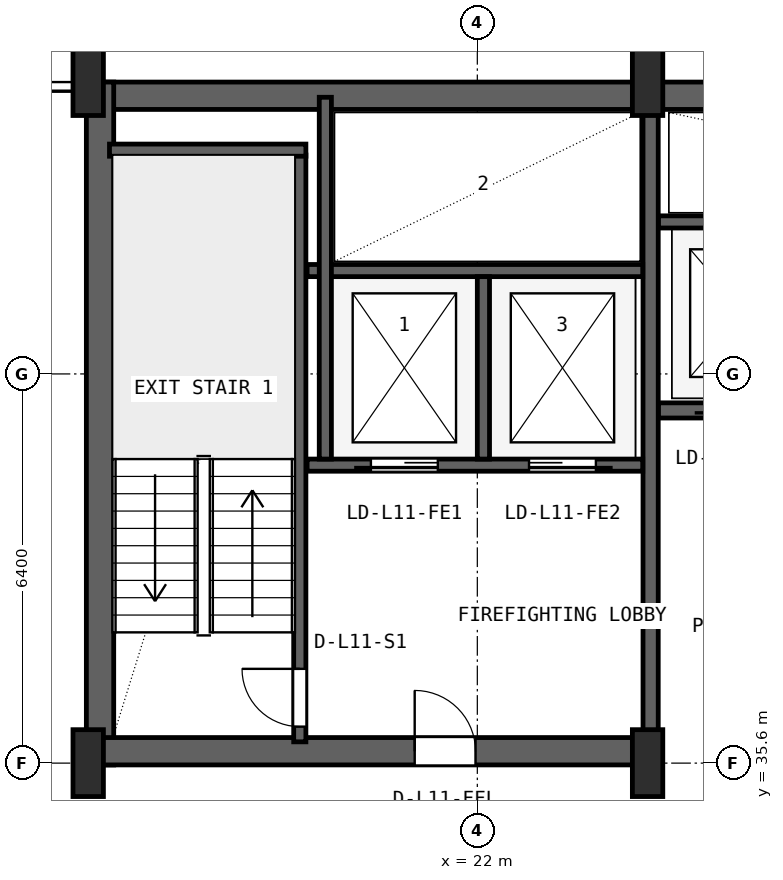
"""IFC4 building model, lengths in metres.
Left out: names, types, materials, properties, quantities, classifications, styles, units other than length and angle.
Written with IfcOpenShell. Run it as: python <this file> out.ifc"""

import sys

from ifc_helpers import new_model, si_unit, direction, frame, frame_2d, origin, origin_2d, place, context, subcontext, project, spatial, rectangle, i_section, extrude, source, transform, mapped, element, fill, save


model = new_model("IFC4")
c1 = context("Model", 3, precision=1e-05, world=origin(), true_north=direction((0.0, 1.0)))
c2 = subcontext(c1, "Body", "Model", "MODEL_VIEW")
j1 = project(units=[si_unit("LENGTHUNIT", "METRE"), si_unit("PLANEANGLEUNIT", "RADIAN")], contexts=[c1])
p1 = place(None, origin())
s1 = spatial("IfcSite", under=j1, at=p1, CompositionType="ELEMENT")
p2 = place(p1, origin())
s2 = spatial("IfcBuilding", under=s1, at=p2, CompositionType="ELEMENT")
p3 = place(p2, frame((0.0, 0.0, 51.0)))
s3 = spatial("IfcBuildingStorey", under=s2, at=p3, CompositionType="ELEMENT", Elevation=51.0)
p4 = place(p3, frame((15.6, 46.575, 0.0), z_axis=(0.0, 0.0, 1.0), x_axis=(1.0, 0.0, 0.0)))
e1 = element("IfcWall", 1, at=p4, inside=s3, PredefinedType="SHEAR", context=c2, shape_type="SweptSolid", body=[
    extrude(rectangle(XDim=36.8, YDim=0.45, at=frame_2d((18.4, 0.0))), origin(), (0.0, 0.0, 1.0), 3.65),
])
p5 = place(p3, frame((15.795, 35.57, 0.0), z_axis=(0.0, 0.0, 1.0), x_axis=(0.0, 1.0, 0.0)))
e2 = element("IfcWall", 2, at=p5, inside=s3, PredefinedType="SHEAR", context=c2, shape_type="SweptSolid", body=[
    extrude(rectangle(XDim=11.23, YDim=0.45, at=frame_2d((5.615, 0.0))), origin(), (0.0, 0.0, 1.0), 3.65),
])
p6 = place(p3, frame((15.57, 35.795, 0.0), z_axis=(0.0, 0.0, 1.0), x_axis=(1.0, 0.0, 0.0)))
e3 = element("IfcWall", 3, at=p6, inside=s3, PredefinedType="SHEAR", context=c2, shape_type="SweptSolid", body=[
    extrude(rectangle(XDim=9.23, YDim=0.45, at=frame_2d((4.615, 0.0))), origin(), (0.0, 0.0, 1.0), 3.65),
])
p7 = place(p6, frame((5.4, 0.0, 0.0)))
e4 = element("IfcOpeningElement", 4, at=p7, cuts=e3, PredefinedType="OPENING", context=c2, shape_type="SweptSolid", body=[
    extrude(rectangle(XDim=1.0, YDim=2.1, at=frame_2d((0.5, 1.05))), frame((0.0, 0.235, 0.0), z_axis=(0.0, -1.0, 0.0), x_axis=(1.0, 0.0, 0.0)), (0.0, 0.0, 1.0), 0.47),
])
m1 = source(origin(), c2, "Body", "SweptSolid", [
    extrude(i_section(OverallWidth=0.5, OverallDepth=1.1, WebThickness=0.018, FlangeThickness=0.032, FilletRadius=0.018, at=origin_2d()), origin(), (0.0, 0.0, 1.0), 3.9),
])
for number, where, z_axis, x_axis in (
    (5, (15.6, 35.6, 0.0), (0.0, 0.0, 1.0), (1.0, 0.0, 0.0)),
    (6, (15.6, 46.8, 0.0), (0.0, 0.0, 1.0), (1.0, 0.0, 0.0)),
    (7, (24.8, 35.6, 0.0), (0.0, 0.0, 1.0), (1.0, 0.0, 0.0)),
    (8, (24.8, 46.8, 0.0), (0.0, 0.0, 1.0), (1.0, 0.0, 0.0)),
):
    element("IfcColumn", number, at=place(p3, frame(where, z_axis=z_axis, x_axis=x_axis)), inside=s3, PredefinedType="COLUMN", context=c2, shape_type="MappedRepresentation", body=[
        mapped(m1, transform((0.0, 0.0, 0.0), x_axis=(1.0, 0.0, 0.0), y_axis=(0.0, 1.0, 0.0), z_axis=(0.0, 0.0, 1.0), scale=1.0)),
    ])
p8 = place(p3, frame((19.08, 35.95, 0.0), z_axis=(0.0, 0.0, 1.0), x_axis=(0.0, 1.0, 0.0)))
e9 = element("IfcWall", 9, at=p8, inside=s3, PredefinedType="SHEAR", context=c2, shape_type="SweptSolid", body=[
    extrude(rectangle(XDim=9.65, YDim=0.2, at=frame_2d((4.825, 0.0))), origin(), (0.0, 0.0, 1.0), 3.65),
])
p9 = place(p8, frame((0.25, 0.0, 0.0)))
e10 = element("IfcOpeningElement", 10, at=p9, cuts=e9, PredefinedType="OPENING", context=c2, shape_type="SweptSolid", body=[
    extrude(rectangle(XDim=0.95, YDim=2.1, at=frame_2d((0.475, 1.05))), frame((0.0, 0.11, 0.0), z_axis=(0.0, -1.0, 0.0), x_axis=(1.0, 0.0, 0.0)), (0.0, 0.0, 1.0), 0.22),
])
p10 = place(p3, frame((15.95, 45.68, 0.0), z_axis=(0.0, 0.0, 1.0), x_axis=(1.0, 0.0, 0.0)))
e11 = element("IfcWall", 11, at=p10, inside=s3, PredefinedType="SHEAR", context=c2, shape_type="SweptSolid", body=[
    extrude(rectangle(XDim=3.23, YDim=0.2, at=frame_2d((1.615, 0.0))), origin(), (0.0, 0.0, 1.0), 3.65),
])
p11 = place(p3, frame((24.85, 36.05, 0.0), z_axis=(0.0, 0.0, 1.0), x_axis=(0.0, 1.0, 0.0)))
e12 = element("IfcWall", 12, at=p11, inside=s3, PredefinedType="SHEAR", context=c2, shape_type="SweptSolid", body=[
    extrude(rectangle(XDim=10.45, YDim=0.25, at=frame_2d((5.225, 0.0))), origin(), (0.0, 0.0, 1.0), 3.65),
])
p12 = place(p3, frame((19.2, 40.5, 0.0), z_axis=(0.0, 0.0, 1.0), x_axis=(1.0, 0.0, 0.0)))
e13 = element("IfcWall", 13, at=p12, inside=s3, PredefinedType="SHEAR", context=c2, shape_type="SweptSolid", body=[
    extrude(rectangle(XDim=5.52, YDim=0.2, at=frame_2d((2.76, 0.0))), origin(), (0.0, 0.0, 1.0), 3.65),
])
p13 = place(p12, frame((1.05, 0.0, 0.0)))
e14 = element("IfcOpeningElement", 14, at=p13, cuts=e13, PredefinedType="OPENING", context=c2, shape_type="SweptSolid", body=[
    extrude(rectangle(XDim=1.1, YDim=2.18, at=frame_2d((0.55, 1.09))), frame((0.0, 0.11, 0.0), z_axis=(0.0, -1.0, 0.0), x_axis=(1.0, 0.0, 0.0)), (0.0, 0.0, 1.0), 0.22),
])
p14 = place(p12, frame((3.65, 0.0, 0.0)))
e15 = element("IfcOpeningElement", 15, at=p14, cuts=e13, PredefinedType="OPENING", context=c2, shape_type="SweptSolid", body=[
    extrude(rectangle(XDim=1.1, YDim=2.18, at=frame_2d((0.55, 1.09))), frame((0.0, 0.11, 0.0), z_axis=(0.0, -1.0, 0.0), x_axis=(1.0, 0.0, 0.0)), (0.0, 0.0, 1.0), 0.22),
])
p15 = place(p3, frame((19.2, 43.7, 0.0), z_axis=(0.0, 0.0, 1.0), x_axis=(1.0, 0.0, 0.0)))
e16 = element("IfcWall", 16, at=p15, inside=s3, PredefinedType="SHEAR", context=c2, shape_type="SweptSolid", body=[
    extrude(rectangle(XDim=5.52, YDim=0.2, at=frame_2d((2.76, 0.0))), origin(), (0.0, 0.0, 1.0), 3.65),
])
p16 = place(p3, frame((22.1, 40.6, 0.0), z_axis=(0.0, 0.0, 1.0), x_axis=(0.0, 1.0, 0.0)))
e17 = element("IfcWall", 17, at=p16, inside=s3, PredefinedType="SHEAR", context=c2, shape_type="SweptSolid", body=[
    extrude(rectangle(XDim=3.0, YDim=0.2, at=frame_2d((1.5, 0.0))), origin(), (0.0, 0.0, 1.0), 3.65),
])
p17 = place(p3, frame((19.5, 40.6, 0.0), z_axis=(0.0, 0.0, 1.0), x_axis=(0.0, 1.0, 0.0)))
e18 = element("IfcWall", 18, at=p17, inside=s3, PredefinedType="SHEAR", context=c2, shape_type="SweptSolid", body=[
    extrude(rectangle(XDim=5.95, YDim=0.2, at=frame_2d((2.975, 0.0))), origin(), (0.0, 0.0, 1.0), 3.65),
])
p18 = place(p3, frame((24.98, 41.4, 0.0), z_axis=(0.0, 0.0, 1.0), x_axis=(1.0, 0.0, 0.0)))
e19 = element("IfcWall", 19, at=p18, inside=s3, PredefinedType="SHEAR", context=c2, shape_type="SweptSolid", body=[
    extrude(rectangle(XDim=23.82, YDim=0.25, at=frame_2d((11.91, 0.0))), origin(), (0.0, 0.0, 1.0), 3.65),
])
p19 = place(p18, frame((0.87, 0.0, 0.0)))
e20 = element("IfcOpeningElement", 20, at=p19, cuts=e19, PredefinedType="OPENING", context=c2, shape_type="SweptSolid", body=[
    extrude(rectangle(XDim=1.1, YDim=2.18, at=frame_2d((0.55, 1.09))), frame((0.0, 0.135, 0.0), z_axis=(0.0, -1.0, 0.0), x_axis=(1.0, 0.0, 0.0)), (0.0, 0.0, 1.0), 0.27),
])
p20 = place(p18, frame((3.47, 0.0, 0.0)))
e21 = element("IfcOpeningElement", 21, at=p20, cuts=e19, PredefinedType="OPENING", context=c2, shape_type="SweptSolid", body=[
    extrude(rectangle(XDim=1.1, YDim=2.18, at=frame_2d((0.55, 1.09))), frame((0.0, 0.135, 0.0), z_axis=(0.0, -1.0, 0.0), x_axis=(1.0, 0.0, 0.0)), (0.0, 0.0, 1.0), 0.27),
])
p21 = place(p18, frame((6.07, 0.0, 0.0)))
e22 = element("IfcOpeningElement", 22, at=p21, cuts=e19, PredefinedType="OPENING", context=c2, shape_type="SweptSolid", body=[
    extrude(rectangle(XDim=1.1, YDim=2.18, at=frame_2d((0.55, 1.09))), frame((0.0, 0.135, 0.0), z_axis=(0.0, -1.0, 0.0), x_axis=(1.0, 0.0, 0.0)), (0.0, 0.0, 1.0), 0.27),
])
p22 = place(p3, frame((24.98, 44.5, 0.0), z_axis=(0.0, 0.0, 1.0), x_axis=(1.0, 0.0, 0.0)))
e23 = element("IfcWall", 23, at=p22, inside=s3, PredefinedType="SHEAR", context=c2, shape_type="SweptSolid", body=[
    extrude(rectangle(XDim=7.87, YDim=0.2, at=frame_2d((3.935, 0.0))), origin(), (0.0, 0.0, 1.0), 3.65),
])
m2 = source(origin(), c2, "Body", "SweptSolid", [
    extrude(rectangle(XDim=0.95, YDim=2.1, at=frame_2d((0.475, 1.05))), frame((0.0, 0.025, 0.0), z_axis=(0.0, -1.0, 0.0), x_axis=(1.0, 0.0, 0.0)), (0.0, 0.0, 1.0), 0.05),
])
p23 = place(p9, origin())
e24 = element("IfcDoor", 24, at=p23, inside=s3, OperationType="SINGLE_SWING_RIGHT", PredefinedType="DOOR", context=c2, shape_type="MappedRepresentation", body=[
    mapped(m2, transform((0.0, 0.0, 0.0), x_axis=(1.0, 0.0, 0.0), y_axis=(0.0, 1.0, 0.0), z_axis=(0.0, 0.0, 1.0), scale=1.0)),
])
fill(e10, e24)
m3 = source(origin(), c2, "Body", "SweptSolid", [
    extrude(rectangle(XDim=1.0, YDim=2.1, at=frame_2d((0.5, 1.05))), frame((0.0, 0.025, 0.0), z_axis=(0.0, -1.0, 0.0), x_axis=(1.0, 0.0, 0.0)), (0.0, 0.0, 1.0), 0.05),
])
p24 = place(p7, origin())
e25 = element("IfcDoor", 25, at=p24, inside=s3, OperationType="SINGLE_SWING_LEFT", PredefinedType="DOOR", context=c2, shape_type="MappedRepresentation", body=[
    mapped(m3, transform((0.0, 0.0, 0.0), x_axis=(1.0, 0.0, 0.0), y_axis=(0.0, 1.0, 0.0), z_axis=(0.0, 0.0, 1.0), scale=1.0)),
])
fill(e4, e25)
m4 = source(origin(), c2, "Body", "SweptSolid", [
    extrude(rectangle(XDim=1.1, YDim=2.18, at=frame_2d((0.55, 1.09))), frame((0.0, 0.025, 0.0), z_axis=(0.0, -1.0, 0.0), x_axis=(1.0, 0.0, 0.0)), (0.0, 0.0, 1.0), 0.05),
])
p25 = place(p13, frame((1.1, 0.0, 0.0), z_axis=(0.0, 0.0, 1.0), x_axis=(-1.0, 0.0, 0.0)))
e26 = element("IfcDoor", 26, at=p25, inside=s3, OperationType="SLIDING_TO_LEFT", PredefinedType="DOOR", context=c2, shape_type="MappedRepresentation", body=[
    mapped(m4, transform((0.0, 0.0, 0.0), x_axis=(1.0, 0.0, 0.0), y_axis=(0.0, 1.0, 0.0), z_axis=(0.0, 0.0, 1.0), scale=1.0)),
])
fill(e14, e26)
p26 = place(p14, frame((1.1, 0.0, 0.0), z_axis=(0.0, 0.0, 1.0), x_axis=(-1.0, 0.0, 0.0)))
e27 = element("IfcDoor", 27, at=p26, inside=s3, OperationType="SLIDING_TO_RIGHT", PredefinedType="DOOR", context=c2, shape_type="MappedRepresentation", body=[
    mapped(m4, transform((0.0, 0.0, 0.0), x_axis=(1.0, 0.0, 0.0), y_axis=(0.0, 1.0, 0.0), z_axis=(0.0, 0.0, 1.0), scale=1.0)),
])
fill(e15, e27)
save(model, sys.argv[1])
